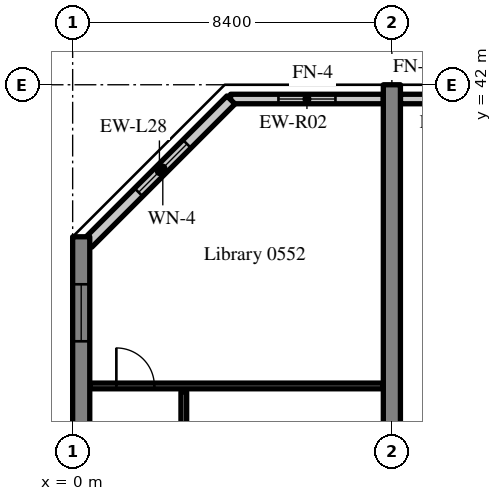
"""IFC4 building model, lengths in metres.
Left out: names, types, materials, properties, quantities, classifications, styles, units other than length and angle.
Written with IfcOpenShell. Run it as: python <this file> out.ifc"""

import sys

from ifc_helpers import new_model, si_unit, direction, frame, frame_2d, origin, place, context, subcontext, project, spatial, rectangle, extrude, source, transform, mapped, element, fill, save


model = new_model("IFC4")
c1 = context("Model", 3, precision=1e-05, world=origin(), true_north=direction((0.0, 1.0)))
c2 = subcontext(c1, "Body", "Model", "MODEL_VIEW")
j1 = project(units=[si_unit("LENGTHUNIT", "METRE"), si_unit("PLANEANGLEUNIT", "RADIAN")], contexts=[c1])
p1 = place(None, origin())
s1 = spatial("IfcSite", under=j1, at=p1, CompositionType="ELEMENT")
p2 = place(p1, origin())
s2 = spatial("IfcBuilding", under=s1, at=p2, CompositionType="ELEMENT")
p3 = place(p2, frame((0.0, 0.0, 27.8)))
s3 = spatial("IfcBuildingStorey", under=s2, at=p3, CompositionType="ELEMENT", Elevation=27.8)
m1 = source(origin(), c2, "Body", "SweptSolid", [
    extrude(rectangle(XDim=16.0, YDim=0.45, at=frame_2d((8.0, 0.0))), origin(), (0.0, 0.0, 1.0), 3.52),
])
p4 = place(p3, frame((0.225, 22.0, 0.0), z_axis=(0.0, 0.0, 1.0), x_axis=(0.0, 1.0, 0.0)))
e1 = element("IfcWall", 1, at=p4, inside=s3, PredefinedType="SHEAR", context=c2, shape_type="MappedRepresentation", body=[
    mapped(m1, transform((0.0, 0.0, 0.0), scale=1.0)),
])
m2 = source(origin(), c2, "Body", "SweptSolid", [
    extrude(rectangle(XDim=1.5, YDim=1.5, at=frame_2d((0.75, 0.75))), frame((0.0, 0.235, 0.0), z_axis=(0.0, -1.0, 0.0), x_axis=(1.0, 0.0, 0.0)), (0.0, 0.0, 1.0), 0.47),
])
p5 = place(p4, frame((1.25, 0.0, 0.9)))
e2 = element("IfcOpeningElement", 2, at=p5, cuts=e1, PredefinedType="OPENING", context=c2, shape_type="MappedRepresentation", body=[
    mapped(m2, transform((0.0, 0.0, 0.0), scale=1.0)),
])
p6 = place(p4, frame((5.25, 0.0, 0.9)))
e3 = element("IfcOpeningElement", 3, at=p6, cuts=e1, PredefinedType="OPENING", context=c2, shape_type="MappedRepresentation", body=[
    mapped(m2, transform((0.0, 0.0, 0.0), scale=1.0)),
])
p7 = place(p4, frame((9.25, 0.0, 0.9)))
e4 = element("IfcOpeningElement", 4, at=p7, cuts=e1, PredefinedType="OPENING", context=c2, shape_type="MappedRepresentation", body=[
    mapped(m2, transform((0.0, 0.0, 0.0), scale=1.0)),
])
p8 = place(p4, frame((13.25, 0.0, 0.9)))
e5 = element("IfcOpeningElement", 5, at=p8, cuts=e1, PredefinedType="OPENING", context=c2, shape_type="MappedRepresentation", body=[
    mapped(m2, transform((0.0, 0.0, 0.0), scale=1.0)),
])
m3 = source(origin(), c2, "Body", "SweptSolid", [
    extrude(rectangle(XDim=20.0, YDim=0.45, at=frame_2d((10.0, 0.0))), origin(), (0.0, 0.0, 1.0), 3.52),
])
p9 = place(p3, frame((8.4, 22.0, 0.0), z_axis=(0.0, 0.0, 1.0), x_axis=(0.0, 1.0, 0.0)))
e6 = element("IfcWall", 6, at=p9, inside=s3, PredefinedType="SHEAR", context=c2, shape_type="MappedRepresentation", body=[
    mapped(m3, transform((0.0, 0.0, 0.0), scale=1.0)),
])
m4 = source(origin(), c2, "Body", "SweptSolid", [
    extrude(rectangle(XDim=4.02, YDim=0.25, at=frame_2d((2.01, 0.0))), origin(), (0.0, 0.0, 1.0), 2.77),
])
p10 = place(p3, frame((8.175, 41.625, 0.0), z_axis=(0.0, 0.0, 1.0), x_axis=(-1.0, 0.0, 0.0)))
e7 = element("IfcWall", 7, at=p10, inside=s3, PredefinedType="SOLIDWALL", context=c2, shape_type="MappedRepresentation", body=[
    mapped(m4, transform((0.0, 0.0, 0.0), scale=1.0)),
])
m5 = source(origin(), c2, "Body", "SweptSolid", [
    extrude(rectangle(XDim=1.5, YDim=1.5, at=frame_2d((0.75, 0.75))), frame((0.0, 0.135, 0.0), z_axis=(0.0, -1.0, 0.0), x_axis=(1.0, 0.0, 0.0)), (0.0, 0.0, 1.0), 0.27),
])
p11 = place(p10, frame((1.26, 0.0, 0.9)))
e8 = element("IfcOpeningElement", 8, at=p11, cuts=e7, PredefinedType="OPENING", context=c2, shape_type="MappedRepresentation", body=[
    mapped(m5, transform((0.0, 0.0, 0.0), scale=1.0)),
])
m6 = source(origin(), c2, "Body", "SweptSolid", [
    extrude(rectangle(XDim=3.525, YDim=0.25, at=frame_2d((1.762, 0.0))), origin(), (0.0, 0.0, 1.0), 2.77),
])
p12 = place(p3, frame((12.15, 41.625, 0.0), z_axis=(0.0, 0.0, 1.0), x_axis=(-1.0, 0.0, 0.0)))
e9 = element("IfcWall", 9, at=p12, inside=s3, PredefinedType="SOLIDWALL", context=c2, shape_type="MappedRepresentation", body=[
    mapped(m6, transform((0.0, 0.0, 0.0), scale=1.0)),
])
p13 = place(p12, frame((1.012, 0.0, 0.9)))
e10 = element("IfcOpeningElement", 10, at=p13, cuts=e9, PredefinedType="OPENING", context=c2, shape_type="MappedRepresentation", body=[
    mapped(m5, transform((0.0, 0.0, 0.0), scale=1.0)),
])
m7 = source(origin(), c2, "Body", "SweptSolid", [
    extrude(rectangle(XDim=5.326, YDim=0.3, at=frame_2d((2.663, 0.0))), origin(), (0.0, 0.0, 1.0), 3.52),
])
p14 = place(p3, frame((4.166, 41.6, 0.0), z_axis=(0.0, 0.0, 1.0), x_axis=(-0.707106781187, -0.707106781187, 0.0)))
e11 = element("IfcWall", 11, at=p14, inside=s3, PredefinedType="SOLIDWALL", context=c2, shape_type="MappedRepresentation", body=[
    mapped(m7, transform((0.0, 0.0, 0.0), scale=1.0)),
])
m8 = source(origin(), c2, "Body", "SweptSolid", [
    extrude(rectangle(XDim=1.8, YDim=1.5, at=frame_2d((0.9, 0.75))), frame((0.0, 0.16, 0.0), z_axis=(0.0, -1.0, 0.0), x_axis=(1.0, 0.0, 0.0)), (0.0, 0.0, 1.0), 0.32),
])
p15 = place(p14, frame((1.636, 0.0, 0.9)))
e12 = element("IfcOpeningElement", 12, at=p15, cuts=e11, PredefinedType="OPENING", context=c2, shape_type="MappedRepresentation", body=[
    mapped(m8, transform((0.0, 0.0, 0.0), scale=1.0)),
])
m9 = source(origin(), c2, "Body", "SweptSolid", [
    extrude(rectangle(XDim=3.85, YDim=0.15, at=frame_2d((1.925, 0.0))), origin(), (0.0, 0.0, 1.0), 3.52),
])
p16 = place(p3, frame((2.925, 30.075, 0.0), z_axis=(0.0, 0.0, 1.0), x_axis=(0.0, 1.0, 0.0)))
e13 = element("IfcWall", 13, at=p16, inside=s3, PredefinedType="PARTITIONING", context=c2, shape_type="MappedRepresentation", body=[
    mapped(m9, transform((0.0, 0.0, 0.0), scale=1.0)),
])
m10 = source(origin(), c2, "Body", "SweptSolid", [
    extrude(rectangle(XDim=1.0, YDim=2.1, at=frame_2d((0.5, 1.05))), frame((0.0, 0.085, 0.0), z_axis=(0.0, -1.0, 0.0), x_axis=(1.0, 0.0, 0.0)), (0.0, 0.0, 1.0), 0.17),
])
p17 = place(p16, frame((1.425, 0.0, 0.0)))
e14 = element("IfcOpeningElement", 14, at=p17, cuts=e13, PredefinedType="OPENING", context=c2, shape_type="MappedRepresentation", body=[
    mapped(m10, transform((0.0, 0.0, 0.0), scale=1.0)),
])
m11 = source(origin(), c2, "Body", "SweptSolid", [
    extrude(rectangle(XDim=7.725, YDim=0.15, at=frame_2d((3.863, 0.0))), origin(), (0.0, 0.0, 1.0), 3.52),
])
p18 = place(p3, frame((0.45, 34.075, 0.0), z_axis=(0.0, 0.0, 1.0), x_axis=(1.0, 0.0, 0.0)))
e15 = element("IfcWall", 15, at=p18, inside=s3, PredefinedType="PARTITIONING", context=c2, shape_type="MappedRepresentation", body=[
    mapped(m11, transform((0.0, 0.0, 0.0), scale=1.0)),
])
p19 = place(p18, frame((0.7, 0.0, 0.0)))
e16 = element("IfcOpeningElement", 16, at=p19, cuts=e15, PredefinedType="OPENING", context=c2, shape_type="MappedRepresentation", body=[
    mapped(m10, transform((0.0, 0.0, 0.0), scale=1.0)),
])
m12 = source(origin(), c2, "Body", "SweptSolid", [
    extrude(rectangle(XDim=1.5, YDim=1.5, at=frame_2d((0.75, 0.75))), frame((0.0, 0.03, 0.0), z_axis=(0.0, -1.0, 0.0), x_axis=(1.0, 0.0, 0.0)), (0.0, 0.0, 1.0), 0.06),
])
p20 = place(p11, origin())
e17 = element("IfcWindow", 17, at=p20, inside=s3, PartitioningType="SINGLE_PANEL", PredefinedType="WINDOW", context=c2, shape_type="MappedRepresentation", body=[
    mapped(m12, transform((0.0, 0.0, 0.0), scale=1.0)),
])
fill(e8, e17)
m13 = source(origin(), c2, "Body", "SweptSolid", [
    extrude(rectangle(XDim=1.8, YDim=1.5, at=frame_2d((0.9, 0.75))), frame((0.0, 0.03, 0.0), z_axis=(0.0, -1.0, 0.0), x_axis=(1.0, 0.0, 0.0)), (0.0, 0.0, 1.0), 0.06),
])
p21 = place(p15, origin())
e18 = element("IfcWindow", 18, at=p21, inside=s3, PartitioningType="SINGLE_PANEL", PredefinedType="WINDOW", context=c2, shape_type="MappedRepresentation", body=[
    mapped(m13, transform((0.0, 0.0, 0.0), scale=1.0)),
])
fill(e12, e18)
p22 = place(p8, origin())
e19 = element("IfcWindow", 19, at=p22, inside=s3, PartitioningType="SINGLE_PANEL", PredefinedType="WINDOW", context=c2, shape_type="MappedRepresentation", body=[
    mapped(m12, transform((0.0, 0.0, 0.0), scale=1.0)),
])
fill(e5, e19)
m14 = source(origin(), c2, "Body", "SweptSolid", [
    extrude(rectangle(XDim=1.0, YDim=2.1, at=frame_2d((0.5, 1.05))), frame((0.0, 0.025, 0.0), z_axis=(0.0, -1.0, 0.0), x_axis=(1.0, 0.0, 0.0)), (0.0, 0.0, 1.0), 0.05),
])
p23 = place(p19, origin())
e20 = element("IfcDoor", 20, at=p23, inside=s3, OperationType="SINGLE_SWING_LEFT", PredefinedType="DOOR", context=c2, shape_type="MappedRepresentation", body=[
    mapped(m14, transform((0.0, 0.0, 0.0), scale=1.0)),
])
fill(e16, e20)
save(model, sys.argv[1])
